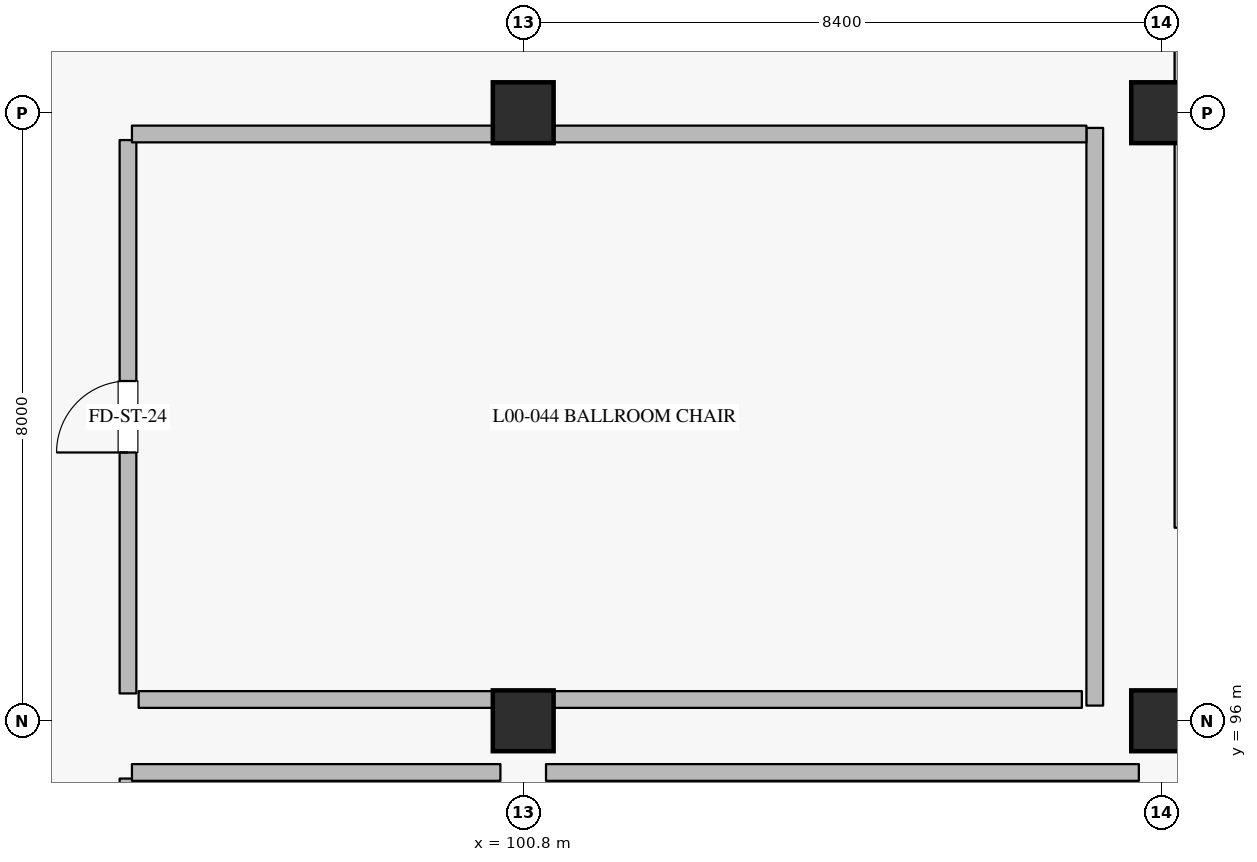
"""IFC4 building model, lengths in metres.
Left out: names, types, materials, properties, quantities, classifications, styles, units other than length and angle.
Written with IfcOpenShell. Run it as: python <this file> out.ifc"""

import sys

from ifc_helpers import new_model, si_unit, direction, frame, frame_2d, origin, origin_2d, place, context, subcontext, project, spatial, rectangle, extrude, element, fill, save


model = new_model("IFC4")
c1 = context("Model", 3, precision=1e-05, world=origin(), true_north=direction((0.0, 1.0)))
c2 = subcontext(c1, "Body", "Model", "MODEL_VIEW")
j1 = project(units=[si_unit("LENGTHUNIT", "METRE"), si_unit("PLANEANGLEUNIT", "RADIAN")], contexts=[c1])
p1 = place(None, origin())
s1 = spatial("IfcSite", under=j1, at=p1, CompositionType="ELEMENT")
p2 = place(p1, origin())
s2 = spatial("IfcBuilding", under=s1, at=p2, CompositionType="ELEMENT")
p3 = place(p2, origin())
s3 = spatial("IfcBuildingStorey", under=s2, at=p3, CompositionType="ELEMENT", Elevation=0.0)
for number, where, z_axis, x_axis in (
    (1, (100.8, 96.0, 0.0), (0.0, 0.0, 1.0), (1.0, 0.0, 0.0)),
    (2, (100.8, 104.0, 0.0), (0.0, 0.0, 1.0), (1.0, 0.0, 0.0)),
    (3, (109.2, 96.0, 0.0), (0.0, 0.0, 1.0), (1.0, 0.0, 0.0)),
    (4, (109.2, 104.0, 0.0), (0.0, 0.0, 1.0), (1.0, 0.0, 0.0)),
):
    element("IfcColumn", number, at=place(p3, frame(where, z_axis=z_axis, x_axis=x_axis)), inside=s3, PredefinedType="COLUMN", context=c2, shape_type="SweptSolid", body=[
        extrude(rectangle(XDim=0.8, YDim=0.8, at=origin_2d()), origin(), (0.0, 0.0, 1.0), 6.0),
    ])
p4 = place(p3, frame((95.6, 73.16, 0.0), z_axis=(0.0, 0.0, 1.0), x_axis=(0.0, 1.0, 0.0)))
e5 = element("IfcWall", 5, at=p4, inside=s3, PredefinedType="PARTITIONING", context=c2, shape_type="SweptSolid", body=[
    extrude(rectangle(XDim=22.08, YDim=0.22, at=frame_2d((11.04, 0.0))), origin(), (0.0, 0.0, 1.0), 5.675),
])
p5 = place(p4, frame((10.29, 0.0, 0.0)))
e6 = element("IfcOpeningElement", 6, at=p5, cuts=e5, PredefinedType="OPENING", context=c2, shape_type="SweptSolid", body=[
    extrude(rectangle(XDim=1.5, YDim=2.3, at=frame_2d((0.75, 1.15))), frame((0.0, 0.12, 0.0), z_axis=(0.0, -1.0, 0.0), x_axis=(1.0, 0.0, 0.0)), (0.0, 0.0, 1.0), 0.24),
])
p6 = place(p3, frame((95.6, 96.36, 0.0), z_axis=(0.0, 0.0, 1.0), x_axis=(0.0, 1.0, 0.0)))
e7 = element("IfcWall", 7, at=p6, inside=s3, PredefinedType="PARTITIONING", context=c2, shape_type="SweptSolid", body=[
    extrude(rectangle(XDim=7.28, YDim=0.22, at=frame_2d((3.64, 0.0))), origin(), (0.0, 0.0, 1.0), 5.675),
])
p7 = place(p6, frame((3.17, 0.0, 0.0)))
e8 = element("IfcOpeningElement", 8, at=p7, cuts=e7, PredefinedType="OPENING", context=c2, shape_type="SweptSolid", body=[
    extrude(rectangle(XDim=0.94, YDim=2.15, at=frame_2d((0.47, 1.075))), frame((0.0, 0.12, 0.0), z_axis=(0.0, -1.0, 0.0), x_axis=(1.0, 0.0, 0.0)), (0.0, 0.0, 1.0), 0.24),
])
p8 = place(p3, frame((95.74, 96.28, 0.0), z_axis=(0.0, 0.0, 1.0), x_axis=(1.0, 0.0, 0.0)))
e9 = element("IfcWall", 9, at=p8, inside=s3, PredefinedType="PARTITIONING", context=c2, shape_type="SweptSolid", body=[
    extrude(rectangle(XDim=12.41, YDim=0.22, at=frame_2d((6.205, 0.0))), origin(), (0.0, 0.0, 1.0), 4.85),
])
p9 = place(p3, frame((109.48, 98.54, 0.0), z_axis=(0.0, 0.0, 1.0), x_axis=(0.0, 1.0, 0.0)))
e10 = element("IfcWall", 10, at=p9, inside=s3, PredefinedType="PARTITIONING", context=c2, shape_type="SweptSolid", body=[
    extrude(rectangle(XDim=12.41, YDim=0.22, at=frame_2d((6.205, 0.0))), origin(), (0.0, 0.0, 1.0), 5.675),
])
p10 = place(p3, frame((95.652, 95.32, 0.0), z_axis=(0.0, 0.0, 1.0), x_axis=(1.0, 0.0, 0.0)))
e11 = element("IfcWall", 11, at=p10, inside=s3, PredefinedType="PARTITIONING", context=c2, shape_type="SweptSolid", body=[
    extrude(rectangle(XDim=4.848, YDim=0.22, at=frame_2d((2.424, 0.0))), origin(), (0.0, 0.0, 1.0), 5.675),
])
p11 = place(p3, frame((101.1, 95.32, 0.0), z_axis=(0.0, 0.0, 1.0), x_axis=(1.0, 0.0, 0.0)))
e12 = element("IfcWall", 12, at=p11, inside=s3, PredefinedType="PARTITIONING", context=c2, shape_type="SweptSolid", body=[
    extrude(rectangle(XDim=7.8, YDim=0.22, at=frame_2d((3.9, 0.0))), origin(), (0.0, 0.0, 1.0), 5.675),
])
p12 = place(p3, frame((108.32, 96.2, 0.0), z_axis=(0.0, 0.0, 1.0), x_axis=(0.0, 1.0, 0.0)))
e13 = element("IfcWall", 13, at=p12, inside=s3, PredefinedType="PARTITIONING", context=c2, shape_type="SweptSolid", body=[
    extrude(rectangle(XDim=7.6, YDim=0.22, at=frame_2d((3.8, 0.0))), origin(), (0.0, 0.0, 1.0), 5.675),
])
p13 = place(p3, frame((95.652, 103.72, 0.0), z_axis=(0.0, 0.0, 1.0), x_axis=(1.0, 0.0, 0.0)))
e14 = element("IfcWall", 14, at=p13, inside=s3, PredefinedType="PARTITIONING", context=c2, shape_type="SweptSolid", body=[
    extrude(rectangle(XDim=4.748, YDim=0.22, at=frame_2d((2.374, 0.0))), origin(), (0.0, 0.0, 1.0), 4.85),
])
p14 = place(p3, frame((101.2, 103.72, 0.0), z_axis=(0.0, 0.0, 1.0), x_axis=(1.0, 0.0, 0.0)))
e15 = element("IfcWall", 15, at=p14, inside=s3, PredefinedType="PARTITIONING", context=c2, shape_type="SweptSolid", body=[
    extrude(rectangle(XDim=7.01, YDim=0.22, at=frame_2d((3.505, 0.0))), origin(), (0.0, 0.0, 1.0), 4.85),
])
p15 = place(p7, origin())
e16 = element("IfcDoor", 16, at=p15, inside=s3, OperationType="SINGLE_SWING_LEFT", PredefinedType="DOOR", context=c2, shape_type="SweptSolid", body=[
    extrude(rectangle(XDim=0.94, YDim=2.15, at=frame_2d((0.47, 1.075))), frame((0.0, 0.025, 0.0), z_axis=(0.0, -1.0, 0.0), x_axis=(1.0, 0.0, 0.0)), (0.0, 0.0, 1.0), 0.05),
])
fill(e8, e16)
save(model, sys.argv[1])
